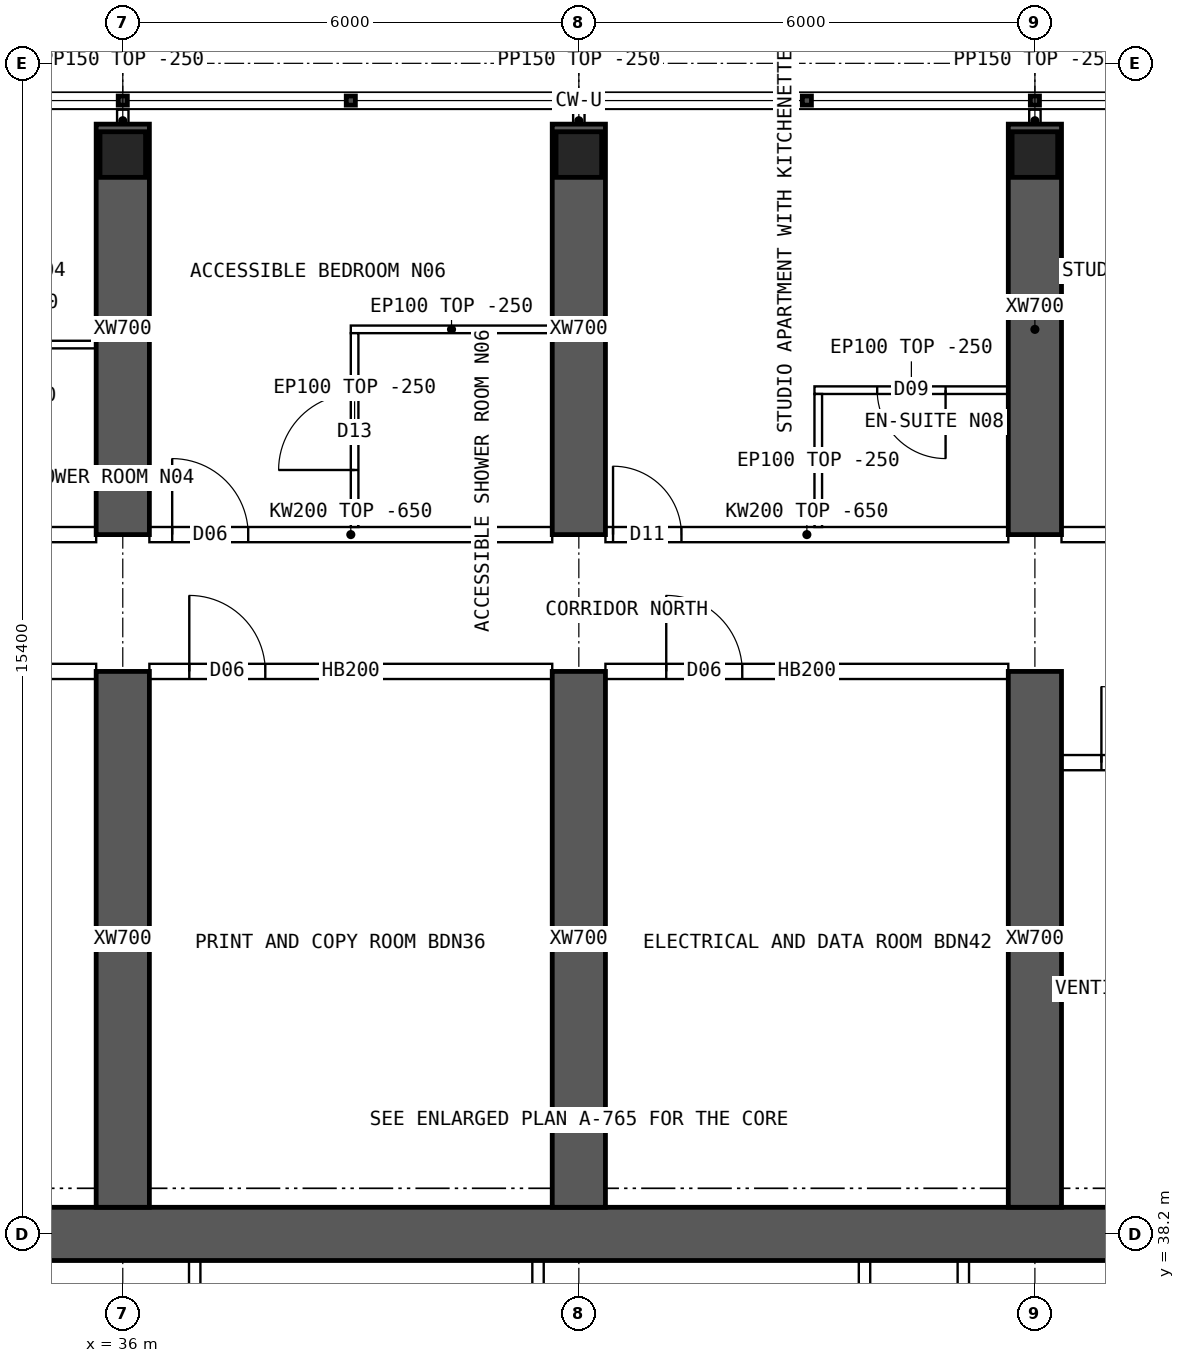
"""IFC4 building model, lengths in metres.
Left out: names, types, materials, properties, quantities, classifications, styles, units other than length and angle.
Written with IfcOpenShell. Run it as: python <this file> out.ifc"""

import sys

from ifc_helpers import new_model, si_unit, direction, frame, frame_2d, origin, origin_2d, place, context, subcontext, project, spatial, polyline, rectangle, hollow_rectangle, outline, extrude, element, fill, save


model = new_model("IFC4")
c1 = context("Model", 3, precision=1e-05, world=origin(), true_north=direction((0.0, 1.0)))
c2 = subcontext(c1, "Body", "Model", "MODEL_VIEW")
j1 = project(units=[si_unit("LENGTHUNIT", "METRE"), si_unit("PLANEANGLEUNIT", "RADIAN")], contexts=[c1])
p1 = place(None, origin())
s1 = spatial("IfcSite", under=j1, at=p1, CompositionType="ELEMENT")
p2 = place(p1, origin())
s2 = spatial("IfcBuilding", under=s1, at=p2, CompositionType="ELEMENT")
p3 = place(p2, frame((0.0, 0.0, 250.3)))
s3 = spatial("IfcBuildingStorey", under=s2, at=p3, CompositionType="ELEMENT", Elevation=250.3)
for number, where, z_axis, x_axis in (
    (1, (36.0, 52.4, 0.0), (0.0, 0.0, 1.0), (1.0, 0.0, 0.0)),
    (2, (42.0, 52.4, 0.0), (0.0, 0.0, 1.0), (1.0, 0.0, 0.0)),
    (3, (48.0, 52.4, 0.0), (0.0, 0.0, 1.0), (1.0, 0.0, 0.0)),
):
    element("IfcColumn", number, at=place(p3, frame(where, z_axis=z_axis, x_axis=x_axis)), inside=s3, PredefinedType="COLUMN", context=c2, shape_type="SweptSolid", body=[
        extrude(hollow_rectangle(XDim=0.6, YDim=0.6, WallThickness=0.06, at=origin_2d()), origin(), (0.0, 0.0, 1.0), 3.75),
    ])
p4 = place(p3, frame((18.0, 38.2, 0.0), z_axis=(0.0, 0.0, 1.0), x_axis=(1.0, 0.0, 0.0)))
e4 = element("IfcWall", 4, at=p4, inside=s3, PredefinedType="SHEAR", context=c2, shape_type="SweptSolid", body=[
    extrude(rectangle(XDim=48.0, YDim=0.7, at=frame_2d((24.0, 0.0))), origin(), (0.0, 0.0, 1.0), 3.75),
])
p5 = place(p3, frame((36.0, 47.4, 0.0), z_axis=(0.0, 0.0, 1.0), x_axis=(0.0, 1.0, 0.0)))
e5 = element("IfcWall", 5, at=p5, inside=s3, PredefinedType="SHEAR", context=c2, shape_type="SweptSolid", body=[
    extrude(rectangle(XDim=5.4, YDim=0.7, at=frame_2d((2.7, 0.0))), origin(), (0.0, 0.0, 1.0), 3.75),
])
p6 = place(p3, frame((36.0, 38.55, 0.0), z_axis=(0.0, 0.0, 1.0), x_axis=(0.0, 1.0, 0.0)))
e6 = element("IfcWall", 6, at=p6, inside=s3, PredefinedType="SHEAR", context=c2, shape_type="SweptSolid", body=[
    extrude(rectangle(XDim=7.05, YDim=0.7, at=frame_2d((3.525, 0.0))), origin(), (0.0, 0.0, 1.0), 3.75),
])
p7 = place(p3, frame((42.0, 47.4, 0.0), z_axis=(0.0, 0.0, 1.0), x_axis=(0.0, 1.0, 0.0)))
e7 = element("IfcWall", 7, at=p7, inside=s3, PredefinedType="SHEAR", context=c2, shape_type="SweptSolid", body=[
    extrude(rectangle(XDim=5.4, YDim=0.7, at=frame_2d((2.7, 0.0))), origin(), (0.0, 0.0, 1.0), 3.75),
])
p8 = place(p3, frame((42.0, 38.55, 0.0), z_axis=(0.0, 0.0, 1.0), x_axis=(0.0, 1.0, 0.0)))
e8 = element("IfcWall", 8, at=p8, inside=s3, PredefinedType="SHEAR", context=c2, shape_type="SweptSolid", body=[
    extrude(rectangle(XDim=7.05, YDim=0.7, at=frame_2d((3.525, 0.0))), origin(), (0.0, 0.0, 1.0), 3.75),
])
p9 = place(p3, frame((48.0, 47.4, 0.0), z_axis=(0.0, 0.0, 1.0), x_axis=(0.0, 1.0, 0.0)))
e9 = element("IfcWall", 9, at=p9, inside=s3, PredefinedType="SHEAR", context=c2, shape_type="SweptSolid", body=[
    extrude(rectangle(XDim=5.4, YDim=0.7, at=frame_2d((2.7, 0.0))), origin(), (0.0, 0.0, 1.0), 3.75),
])
p10 = place(p3, frame((48.0, 38.55, 0.0), z_axis=(0.0, 0.0, 1.0), x_axis=(0.0, 1.0, 0.0)))
e10 = element("IfcWall", 10, at=p10, inside=s3, PredefinedType="SHEAR", context=c2, shape_type="SweptSolid", body=[
    extrude(rectangle(XDim=7.05, YDim=0.7, at=frame_2d((3.525, 0.0))), origin(), (0.0, 0.0, 1.0), 3.75),
])
for number, where, z_axis, x_axis in (
    (11, (36.946, 34.75, 0.0), (0.0, 0.0, 1.0), (0.0, 1.0, 0.0)),
    (12, (41.463, 34.75, 0.0), (0.0, 0.0, 1.0), (0.0, 1.0, 0.0)),
    (13, (45.758, 34.75, 0.0), (0.0, 0.0, 1.0), (0.0, 1.0, 0.0)),
    (14, (47.058, 34.75, 0.0), (0.0, 0.0, 1.0), (0.0, 1.0, 0.0)),
):
    element("IfcWall", number, at=place(p3, frame(where, z_axis=z_axis, x_axis=x_axis)), inside=s3, PredefinedType="SOLIDWALL", context=c2, shape_type="SweptSolid", body=[
        extrude(rectangle(XDim=3.1, YDim=0.15, at=frame_2d((1.55, 0.0))), origin(), (0.0, 0.0, 1.0), 3.5),
    ])
p11 = place(p3, frame((30.35, 47.4, 0.0), z_axis=(0.0, 0.0, 1.0), x_axis=(1.0, 0.0, 0.0)))
e15 = element("IfcWall", 15, at=p11, inside=s3, PredefinedType="SOLIDWALL", context=c2, shape_type="SweptSolid", body=[
    extrude(outline(polyline([(0.0, 0.0), (5.3, 0.0), (5.3, 3.1), (0.0, 3.1), (0.0, 0.0)])), frame((0.0, 0.1, 0.0), z_axis=(0.0, -1.0, 0.0), x_axis=(1.0, 0.0, 0.0)), (0.0, 0.0, 1.0), 0.2),
])
p12 = place(p11, frame((2.3, 0.0, 0.0)))
e16 = element("IfcOpeningElement", 16, at=p12, cuts=e15, PredefinedType="OPENING", context=c2, shape_type="SweptSolid", body=[
    extrude(rectangle(XDim=0.9, YDim=2.1, at=frame_2d((0.45, 1.05))), frame((0.0, 0.11, 0.0), z_axis=(0.0, -1.0, 0.0), x_axis=(1.0, 0.0, 0.0)), (0.0, 0.0, 1.0), 0.22),
])
p13 = place(p3, frame((30.35, 45.6, 0.0), z_axis=(0.0, 0.0, 1.0), x_axis=(1.0, 0.0, 0.0)))
e17 = element("IfcWall", 17, at=p13, inside=s3, PredefinedType="SOLIDWALL", context=c2, shape_type="SweptSolid", body=[
    extrude(rectangle(XDim=5.3, YDim=0.2, at=frame_2d((2.65, 0.0))), origin(), (0.0, 0.0, 1.0), 3.5),
])
p14 = place(p13, frame((0.8, 0.0, 0.0)))
e18 = element("IfcOpeningElement", 18, at=p14, cuts=e17, PredefinedType="OPENING", context=c2, shape_type="SweptSolid", body=[
    extrude(rectangle(XDim=1.0, YDim=2.1, at=frame_2d((0.5, 1.05))), frame((0.0, 0.11, 0.0), z_axis=(0.0, -1.0, 0.0), x_axis=(1.0, 0.0, 0.0)), (0.0, 0.0, 1.0), 0.22),
])
p15 = place(p3, frame((36.35, 47.4, 0.0), z_axis=(0.0, 0.0, 1.0), x_axis=(1.0, 0.0, 0.0)))
e19 = element("IfcWall", 19, at=p15, inside=s3, PredefinedType="SOLIDWALL", context=c2, shape_type="SweptSolid", body=[
    extrude(outline(polyline([(0.0, 0.0), (5.3, 0.0), (5.3, 3.1), (0.0, 3.1), (0.0, 0.0)])), frame((0.0, 0.1, 0.0), z_axis=(0.0, -1.0, 0.0), x_axis=(1.0, 0.0, 0.0)), (0.0, 0.0, 1.0), 0.2),
])
p16 = place(p15, frame((0.3, 0.0, 0.0)))
e20 = element("IfcOpeningElement", 20, at=p16, cuts=e19, PredefinedType="OPENING", context=c2, shape_type="SweptSolid", body=[
    extrude(rectangle(XDim=1.0, YDim=2.1, at=frame_2d((0.5, 1.05))), frame((0.0, 0.11, 0.0), z_axis=(0.0, -1.0, 0.0), x_axis=(1.0, 0.0, 0.0)), (0.0, 0.0, 1.0), 0.22),
])
p17 = place(p3, frame((36.35, 45.6, 0.0), z_axis=(0.0, 0.0, 1.0), x_axis=(1.0, 0.0, 0.0)))
e21 = element("IfcWall", 21, at=p17, inside=s3, PredefinedType="SOLIDWALL", context=c2, shape_type="SweptSolid", body=[
    extrude(rectangle(XDim=5.3, YDim=0.2, at=frame_2d((2.65, 0.0))), origin(), (0.0, 0.0, 1.0), 3.5),
])
p18 = place(p17, frame((0.525, 0.0, 0.0)))
e22 = element("IfcOpeningElement", 22, at=p18, cuts=e21, PredefinedType="OPENING", context=c2, shape_type="SweptSolid", body=[
    extrude(rectangle(XDim=1.0, YDim=2.1, at=frame_2d((0.5, 1.05))), frame((0.0, 0.11, 0.0), z_axis=(0.0, -1.0, 0.0), x_axis=(1.0, 0.0, 0.0)), (0.0, 0.0, 1.0), 0.22),
])
p19 = place(p3, frame((42.35, 47.4, 0.0), z_axis=(0.0, 0.0, 1.0), x_axis=(1.0, 0.0, 0.0)))
e23 = element("IfcWall", 23, at=p19, inside=s3, PredefinedType="SOLIDWALL", context=c2, shape_type="SweptSolid", body=[
    extrude(outline(polyline([(0.0, 0.0), (5.3, 0.0), (5.3, 3.1), (0.0, 3.1), (0.0, 0.0)])), frame((0.0, 0.1, 0.0), z_axis=(0.0, -1.0, 0.0), x_axis=(1.0, 0.0, 0.0)), (0.0, 0.0, 1.0), 0.2),
])
p20 = place(p19, frame((0.1, 0.0, 0.0)))
e24 = element("IfcOpeningElement", 24, at=p20, cuts=e23, PredefinedType="OPENING", context=c2, shape_type="SweptSolid", body=[
    extrude(rectangle(XDim=0.9, YDim=2.1, at=frame_2d((0.45, 1.05))), frame((0.0, 0.11, 0.0), z_axis=(0.0, -1.0, 0.0), x_axis=(1.0, 0.0, 0.0)), (0.0, 0.0, 1.0), 0.22),
])
p21 = place(p3, frame((42.35, 45.6, 0.0), z_axis=(0.0, 0.0, 1.0), x_axis=(1.0, 0.0, 0.0)))
e25 = element("IfcWall", 25, at=p21, inside=s3, PredefinedType="SOLIDWALL", context=c2, shape_type="SweptSolid", body=[
    extrude(rectangle(XDim=5.3, YDim=0.2, at=frame_2d((2.65, 0.0))), origin(), (0.0, 0.0, 1.0), 3.5),
])
p22 = place(p21, frame((0.8, 0.0, 0.0)))
e26 = element("IfcOpeningElement", 26, at=p22, cuts=e25, PredefinedType="OPENING", context=c2, shape_type="SweptSolid", body=[
    extrude(rectangle(XDim=1.0, YDim=2.1, at=frame_2d((0.5, 1.05))), frame((0.0, 0.11, 0.0), z_axis=(0.0, -1.0, 0.0), x_axis=(1.0, 0.0, 0.0)), (0.0, 0.0, 1.0), 0.22),
])
p23 = place(p3, frame((48.35, 47.4, 0.0), z_axis=(0.0, 0.0, 1.0), x_axis=(1.0, 0.0, 0.0)))
e27 = element("IfcWall", 27, at=p23, inside=s3, PredefinedType="SOLIDWALL", context=c2, shape_type="SweptSolid", body=[
    extrude(outline(polyline([(0.0, 0.0), (5.3, 0.0), (5.3, 3.1), (0.0, 3.1), (0.0, 0.0)])), frame((0.0, 0.1, 0.0), z_axis=(0.0, -1.0, 0.0), x_axis=(1.0, 0.0, 0.0)), (0.0, 0.0, 1.0), 0.2),
])
p24 = place(p23, frame((2.3, 0.0, 0.0)))
e28 = element("IfcOpeningElement", 28, at=p24, cuts=e27, PredefinedType="OPENING", context=c2, shape_type="SweptSolid", body=[
    extrude(rectangle(XDim=0.9, YDim=2.1, at=frame_2d((0.45, 1.05))), frame((0.0, 0.11, 0.0), z_axis=(0.0, -1.0, 0.0), x_axis=(1.0, 0.0, 0.0)), (0.0, 0.0, 1.0), 0.22),
])
p25 = place(p3, frame((32.5, 49.9, 0.0), z_axis=(0.0, 0.0, 1.0), x_axis=(1.0, 0.0, 0.0)))
e29 = element("IfcWall", 29, at=p25, inside=s3, PredefinedType="PARTITIONING", context=c2, shape_type="SweptSolid", body=[
    extrude(rectangle(XDim=3.15, YDim=0.1, at=frame_2d((1.575, 0.0))), origin(), (0.0, 0.0, 1.0), 3.5),
])
p26 = place(p25, frame((0.25, 0.0, 0.0)))
e30 = element("IfcOpeningElement", 30, at=p26, cuts=e29, PredefinedType="OPENING", context=c2, shape_type="SweptSolid", body=[
    extrude(rectangle(XDim=0.8, YDim=2.1, at=frame_2d((0.4, 1.05))), frame((0.0, 0.06, 0.0), z_axis=(0.0, -1.0, 0.0), x_axis=(1.0, 0.0, 0.0)), (0.0, 0.0, 1.0), 0.12),
])
p27 = place(p3, frame((39.0, 50.1, 0.0), z_axis=(0.0, 0.0, 1.0), x_axis=(1.0, 0.0, 0.0)))
e31 = element("IfcWall", 31, at=p27, inside=s3, PredefinedType="PARTITIONING", context=c2, shape_type="SweptSolid", body=[
    extrude(rectangle(XDim=2.65, YDim=0.1, at=frame_2d((1.325, 0.0))), origin(), (0.0, 0.0, 1.0), 3.5),
])
p28 = place(p3, frame((39.05, 50.05, 0.0), z_axis=(0.0, 0.0, 1.0), x_axis=(0.0, -1.0, 0.0)))
e32 = element("IfcWall", 32, at=p28, inside=s3, PredefinedType="PARTITIONING", context=c2, shape_type="SweptSolid", body=[
    extrude(outline(polyline([(0.0, 0.0), (2.55, 0.0), (2.55, 3.1), (2.502, 3.1), (2.5, 3.5), (0.0, 3.5), (0.0, 0.0)])), frame((0.0, 0.05, 0.0), z_axis=(0.0, -1.0, 0.0), x_axis=(1.0, 0.0, 0.0)), (0.0, 0.0, 1.0), 0.1),
])
p29 = place(p28, frame((0.8, 0.0, 0.0)))
e33 = element("IfcOpeningElement", 33, at=p29, cuts=e32, PredefinedType="OPENING", context=c2, shape_type="SweptSolid", body=[
    extrude(rectangle(XDim=1.0, YDim=2.1, at=frame_2d((0.5, 1.05))), frame((0.0, 0.06, 0.0), z_axis=(0.0, -1.0, 0.0), x_axis=(1.0, 0.0, 0.0)), (0.0, 0.0, 1.0), 0.12),
])
p30 = place(p3, frame((45.1, 49.3, 0.0), z_axis=(0.0, 0.0, 1.0), x_axis=(1.0, 0.0, 0.0)))
e34 = element("IfcWall", 34, at=p30, inside=s3, PredefinedType="PARTITIONING", context=c2, shape_type="SweptSolid", body=[
    extrude(rectangle(XDim=2.55, YDim=0.1, at=frame_2d((1.275, 0.0))), origin(), (0.0, 0.0, 1.0), 3.5),
])
p31 = place(p30, frame((0.825, 0.0, 0.0)))
e35 = element("IfcOpeningElement", 35, at=p31, cuts=e34, PredefinedType="OPENING", context=c2, shape_type="SweptSolid", body=[
    extrude(rectangle(XDim=0.9, YDim=2.1, at=frame_2d((0.45, 1.05))), frame((0.0, 0.06, 0.0), z_axis=(0.0, -1.0, 0.0), x_axis=(1.0, 0.0, 0.0)), (0.0, 0.0, 1.0), 0.12),
])
p32 = place(p3, frame((45.15, 49.25, 0.0), z_axis=(0.0, 0.0, 1.0), x_axis=(0.0, -1.0, 0.0)))
e36 = element("IfcWall", 36, at=p32, inside=s3, PredefinedType="PARTITIONING", context=c2, shape_type="SweptSolid", body=[
    extrude(outline(polyline([(0.0, 0.0), (1.75, 0.0), (1.75, 3.1), (1.702, 3.1), (1.7, 3.5), (0.0, 3.5), (0.0, 0.0)])), frame((0.0, 0.05, 0.0), z_axis=(0.0, -1.0, 0.0), x_axis=(1.0, 0.0, 0.0)), (0.0, 0.0, 1.0), 0.1),
])
p33 = place(p3, frame((48.35, 44.4, 0.0), z_axis=(0.0, 0.0, 1.0), x_axis=(1.0, 0.0, 0.0)))
e37 = element("IfcWall", 37, at=p33, inside=s3, PredefinedType="SOLIDWALL", context=c2, shape_type="SweptSolid", body=[
    extrude(rectangle(XDim=5.3, YDim=0.2, at=frame_2d((2.65, 0.0))), origin(), (0.0, 0.0, 1.0), 3.5),
])
p34 = place(p33, frame((0.525, 0.0, 0.0)))
e38 = element("IfcOpeningElement", 38, at=p34, cuts=e37, PredefinedType="OPENING", context=c2, shape_type="SweptSolid", body=[
    extrude(rectangle(XDim=1.0, YDim=2.1, at=frame_2d((0.5, 1.05))), frame((0.0, 0.11, 0.0), z_axis=(0.0, -1.0, 0.0), x_axis=(1.0, 0.0, 0.0)), (0.0, 0.0, 1.0), 0.22),
])
for number, where, z_axis, x_axis in (
    (39, (36.0, 52.7, 0.0), (0.0, 0.0, 1.0), (0.0, 1.0, 0.0)),
    (40, (42.0, 52.7, 0.0), (0.0, 0.0, 1.0), (0.0, 1.0, 0.0)),
    (41, (48.0, 52.7, 0.0), (0.0, 0.0, 1.0), (0.0, 1.0, 0.0)),
):
    element("IfcWall", number, at=place(p3, frame(where, z_axis=z_axis, x_axis=x_axis)), inside=s3, PredefinedType="PARTITIONING", context=c2, shape_type="SweptSolid", body=[
        extrude(rectangle(XDim=0.29, YDim=0.15, at=frame_2d((0.145, 0.0))), origin(), (0.0, 0.0, 1.0), 3.5),
    ])
p35 = place(p29, origin())
e42 = element("IfcDoor", 42, at=p35, inside=s3, OperationType="SINGLE_SWING_RIGHT", PredefinedType="DOOR", context=c2, shape_type="SweptSolid", body=[
    extrude(rectangle(XDim=1.0, YDim=2.1, at=frame_2d((0.5, 1.05))), frame((0.0, 0.025, 0.0), z_axis=(0.0, -1.0, 0.0), x_axis=(1.0, 0.0, 0.0)), (0.0, 0.0, 1.0), 0.05),
])
fill(e33, e42)
p36 = place(p16, origin())
e43 = element("IfcDoor", 43, at=p36, inside=s3, OperationType="SINGLE_SWING_LEFT", PredefinedType="DOOR", context=c2, shape_type="SweptSolid", body=[
    extrude(rectangle(XDim=1.0, YDim=2.1, at=frame_2d((0.5, 1.05))), frame((0.0, 0.025, 0.0), z_axis=(0.0, -1.0, 0.0), x_axis=(1.0, 0.0, 0.0)), (0.0, 0.0, 1.0), 0.05),
])
fill(e20, e43)
p37 = place(p31, origin())
e44 = element("IfcDoor", 44, at=p37, inside=s3, OperationType="SINGLE_SWING_RIGHT", PredefinedType="DOOR", context=c2, shape_type="SweptSolid", body=[
    extrude(rectangle(XDim=0.9, YDim=2.1, at=frame_2d((0.45, 1.05))), frame((0.0, 0.025, 0.0), z_axis=(0.0, -1.0, 0.0), x_axis=(1.0, 0.0, 0.0)), (0.0, 0.0, 1.0), 0.05),
])
fill(e35, e44)
p38 = place(p20, origin())
e45 = element("IfcDoor", 45, at=p38, inside=s3, OperationType="SINGLE_SWING_LEFT", PredefinedType="DOOR", context=c2, shape_type="SweptSolid", body=[
    extrude(rectangle(XDim=0.9, YDim=2.1, at=frame_2d((0.45, 1.05))), frame((0.0, 0.025, 0.0), z_axis=(0.0, -1.0, 0.0), x_axis=(1.0, 0.0, 0.0)), (0.0, 0.0, 1.0), 0.05),
])
fill(e24, e45)
p39 = place(p18, origin())
e46 = element("IfcDoor", 46, at=p39, inside=s3, OperationType="SINGLE_SWING_LEFT", PredefinedType="DOOR", context=c2, shape_type="SweptSolid", body=[
    extrude(rectangle(XDim=1.0, YDim=2.1, at=frame_2d((0.5, 1.05))), frame((0.0, 0.025, 0.0), z_axis=(0.0, -1.0, 0.0), x_axis=(1.0, 0.0, 0.0)), (0.0, 0.0, 1.0), 0.05),
])
fill(e22, e46)
p40 = place(p22, origin())
e47 = element("IfcDoor", 47, at=p40, inside=s3, OperationType="SINGLE_SWING_LEFT", PredefinedType="DOOR", context=c2, shape_type="SweptSolid", body=[
    extrude(rectangle(XDim=1.0, YDim=2.1, at=frame_2d((0.5, 1.05))), frame((0.0, 0.025, 0.0), z_axis=(0.0, -1.0, 0.0), x_axis=(1.0, 0.0, 0.0)), (0.0, 0.0, 1.0), 0.05),
])
fill(e26, e47)
p41 = place(p34, origin())
e48 = element("IfcDoor", 48, at=p41, inside=s3, OperationType="SINGLE_SWING_LEFT", PredefinedType="DOOR", context=c2, shape_type="SweptSolid", body=[
    extrude(rectangle(XDim=1.0, YDim=2.1, at=frame_2d((0.5, 1.05))), frame((0.0, 0.025, 0.0), z_axis=(0.0, -1.0, 0.0), x_axis=(1.0, 0.0, 0.0)), (0.0, 0.0, 1.0), 0.05),
])
fill(e38, e48)
save(model, sys.argv[1])
